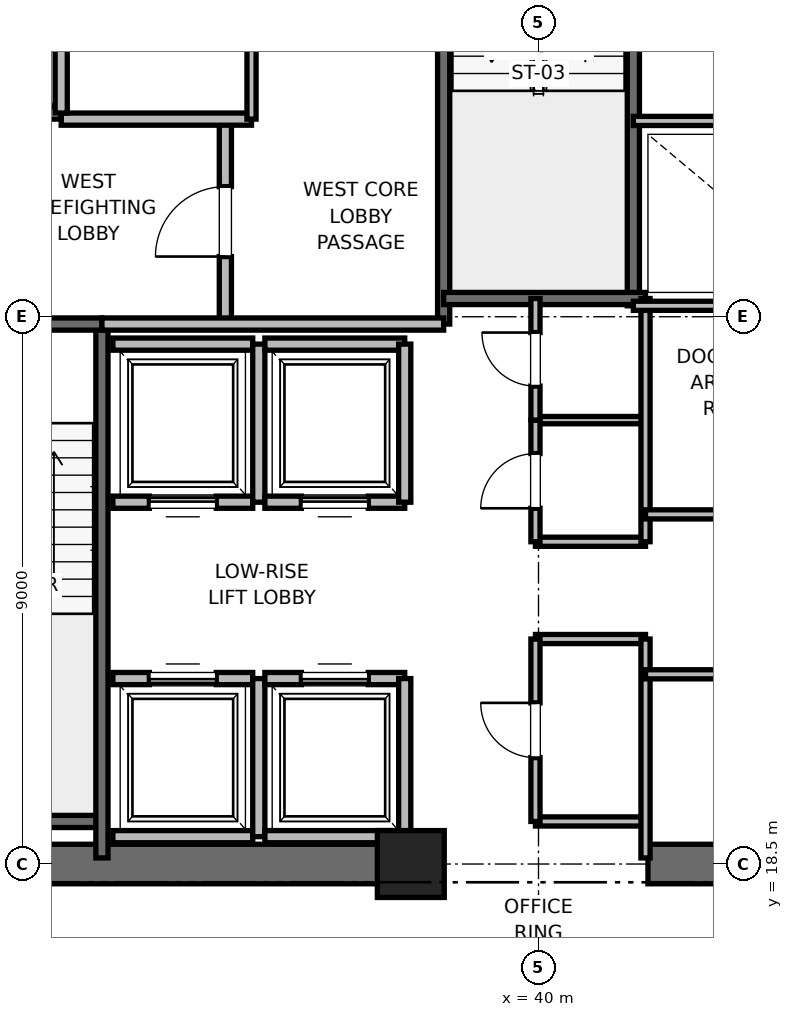
"""IFC4 building model, lengths in metres.
Left out: names, types, materials, properties, quantities, classifications, styles, units other than length and angle.
Written with IfcOpenShell. Run it as: python <this file> out.ifc"""

import sys

from ifc_helpers import new_model, si_unit, direction, frame, frame_2d, origin, origin_2d, place, context, subcontext, project, spatial, rectangle, extrude, element, fill, save


model = new_model("IFC4")
c1 = context("Model", 3, precision=1e-05, world=origin(), true_north=direction((0.0, 1.0)))
c2 = subcontext(c1, "Body", "Model", "MODEL_VIEW")
j1 = project(units=[si_unit("LENGTHUNIT", "METRE"), si_unit("PLANEANGLEUNIT", "RADIAN")], contexts=[c1])
p1 = place(None, origin())
s1 = spatial("IfcSite", under=j1, at=p1, CompositionType="ELEMENT")
p2 = place(p1, origin())
s2 = spatial("IfcBuilding", under=s1, at=p2, CompositionType="ELEMENT")
p3 = place(p2, frame((0.0, 0.0, 79.6)))
s3 = spatial("IfcBuildingStorey", under=s2, at=p3, CompositionType="ELEMENT", Elevation=79.6)
p4 = place(p3, frame((37.9, 18.5, 0.0), z_axis=(0.0, 0.0, 1.0), x_axis=(1.0, 0.0, 0.0)))
e1 = element("IfcColumn", 1, at=p4, inside=s3, PredefinedType="PILASTER", context=c2, shape_type="SweptSolid", body=[
    extrude(rectangle(XDim=1.1, YDim=1.1, at=origin_2d()), origin(), (0.0, 0.0, 1.0), 4.0),
])
for number, where, z_axis, x_axis in (
    (2, (29.0, 18.5, 0.0), (0.0, 0.0, 1.0), (1.0, 0.0, 0.0)),
    (3, (41.8, 18.5, 0.0), (0.0, 0.0, 1.0), (1.0, 0.0, 0.0)),
):
    element("IfcWall", number, at=place(p3, frame(where, z_axis=z_axis, x_axis=x_axis)), inside=s3, PredefinedType="SHEAR", context=c2, shape_type="SweptSolid", body=[
        extrude(rectangle(XDim=9.2, YDim=0.65, at=frame_2d((4.6, 0.0))), origin(), (0.0, 0.0, 1.0), 3.76),
    ])
p5 = place(p3, frame((29.7, 19.2, 0.0), z_axis=(0.0, 0.0, 1.0), x_axis=(1.0, 0.0, 0.0)))
e4 = element("IfcWall", 4, at=p5, inside=s3, PredefinedType="SOLIDWALL", context=c2, shape_type="SweptSolid", body=[
    extrude(rectangle(XDim=3.12, YDim=0.2, at=frame_2d((1.56, 0.0))), origin(), (0.0, 0.0, 1.0), 3.76),
])
p6 = place(p3, frame((32.82, 18.6, 0.0), z_axis=(0.0, 0.0, 1.0), x_axis=(0.0, 1.0, 0.0)))
e5 = element("IfcWall", 5, at=p6, inside=s3, PredefinedType="SOLIDWALL", context=c2, shape_type="SweptSolid", body=[
    extrude(rectangle(XDim=8.78, YDim=0.2, at=frame_2d((4.39, 0.0))), origin(), (0.0, 0.0, 1.0), 3.76),
])
p7 = place(p3, frame((29.7, 27.38, 0.0), z_axis=(0.0, 0.0, 1.0), x_axis=(1.0, 0.0, 0.0)))
e6 = element("IfcWall", 6, at=p7, inside=s3, PredefinedType="SOLIDWALL", context=c2, shape_type="SweptSolid", body=[
    extrude(rectangle(XDim=3.12, YDim=0.2, at=frame_2d((1.56, 0.0))), origin(), (0.0, 0.0, 1.0), 3.76),
])
p8 = place(p7, frame((1.01, 0.0, 0.0)))
e7 = element("IfcOpeningElement", 7, at=p8, cuts=e6, PredefinedType="OPENING", context=c2, shape_type="SweptSolid", body=[
    extrude(rectangle(XDim=1.1, YDim=2.15, at=frame_2d((0.55, 1.075))), frame((0.0, 0.1, 0.0), z_axis=(0.0, -1.0, 0.0), x_axis=(1.0, 0.0, 0.0)), (0.0, 0.0, 1.0), 0.2),
])
p9 = place(p3, frame((38.44, 27.38, 0.0), z_axis=(0.0, 0.0, 1.0), x_axis=(0.0, 1.0, 0.0)))
e8 = element("IfcWall", 8, at=p9, inside=s3, PredefinedType="SOLIDWALL", context=c2, shape_type="SweptSolid", body=[
    extrude(rectangle(XDim=8.87, YDim=0.2, at=frame_2d((4.435, 0.0))), origin(), (0.0, 0.0, 1.0), 3.76),
])
p10 = place(p3, frame((41.56, 27.68, 0.0), z_axis=(0.0, 0.0, 1.0), x_axis=(0.0, 1.0, 0.0)))
e9 = element("IfcWall", 9, at=p10, inside=s3, PredefinedType="SOLIDWALL", context=c2, shape_type="SweptSolid", body=[
    extrude(rectangle(XDim=8.57, YDim=0.2, at=frame_2d((4.285, 0.0))), origin(), (0.0, 0.0, 1.0), 3.76),
])
p11 = place(p3, frame((38.44, 27.8, 0.0), z_axis=(0.0, 0.0, 1.0), x_axis=(1.0, 0.0, 0.0)))
e10 = element("IfcWall", 10, at=p11, inside=s3, PredefinedType="SOLIDWALL", context=c2, shape_type="SweptSolid", body=[
    extrude(rectangle(XDim=3.32, YDim=0.2, at=frame_2d((1.66, 0.0))), origin(), (0.0, 0.0, 1.0), 3.76),
])
p12 = place(p3, frame((34.85, 27.38, 0.0), z_axis=(0.0, 0.0, 1.0), x_axis=(0.0, 1.0, 0.0)))
e11 = element("IfcWall", 11, at=p12, inside=s3, PredefinedType="PARTITIONING", context=c2, shape_type="SweptSolid", body=[
    extrude(rectangle(XDim=3.37, YDim=0.2, at=frame_2d((1.685, 0.0))), origin(), (0.0, 0.0, 1.0), 3.76),
])
p13 = place(p12, frame((1.11, 0.0, 0.0)))
e12 = element("IfcOpeningElement", 12, at=p13, cuts=e11, PredefinedType="OPENING", context=c2, shape_type="SweptSolid", body=[
    extrude(rectangle(XDim=1.15, YDim=2.2, at=frame_2d((0.575, 1.1))), frame((0.0, 0.1, 0.0), z_axis=(0.0, -1.0, 0.0), x_axis=(1.0, 0.0, 0.0)), (0.0, 0.0, 1.0), 0.2),
])
p14 = place(p3, frame((32.82, 27.38, 0.0), z_axis=(0.0, 0.0, 1.0), x_axis=(1.0, 0.0, 0.0)))
e13 = element("IfcWall", 13, at=p14, inside=s3, PredefinedType="PARTITIONING", context=c2, shape_type="SweptSolid", body=[
    extrude(rectangle(XDim=5.62, YDim=0.2, at=frame_2d((2.81, 0.0))), origin(), (0.0, 0.0, 1.0), 3.76),
])
p15 = place(p3, frame((32.15, 30.75, 0.0), z_axis=(0.0, 0.0, 1.0), x_axis=(1.0, 0.0, 0.0)))
e14 = element("IfcWall", 14, at=p15, inside=s3, PredefinedType="PARTITIONING", context=c2, shape_type="SweptSolid", body=[
    extrude(rectangle(XDim=3.13, YDim=0.2, at=frame_2d((1.565, 0.0))), origin(), (0.0, 0.0, 1.0), 3.76),
])
p16 = place(p3, frame((29.55, 30.85, 0.0), z_axis=(0.0, 0.0, 1.0), x_axis=(1.0, 0.0, 0.0)))
e15 = element("IfcWall", 15, at=p16, inside=s3, PredefinedType="SOLIDWALL", context=c2, shape_type="SweptSolid", body=[
    extrude(rectangle(XDim=2.6, YDim=0.2, at=frame_2d((1.3, 0.0))), origin(), (0.0, 0.0, 1.0), 2.54),
])
p17 = place(p16, frame((0.75, 0.0, 0.0)))
e16 = element("IfcOpeningElement", 16, at=p17, cuts=e15, PredefinedType="OPENING", context=c2, shape_type="SweptSolid", body=[
    extrude(rectangle(XDim=1.1, YDim=2.2, at=frame_2d((0.55, 1.1))), frame((0.0, 0.1, 0.0), z_axis=(0.0, -1.0, 0.0), x_axis=(1.0, 0.0, 0.0)), (0.0, 0.0, 1.0), 0.2),
])
p18 = place(p3, frame((32.15, 30.85, 0.0), z_axis=(0.0, 0.0, 1.0), x_axis=(0.0, 1.0, 0.0)))
e17 = element("IfcWall", 17, at=p18, inside=s3, PredefinedType="SOLIDWALL", context=c2, shape_type="SweptSolid", body=[
    extrude(rectangle(XDim=3.0, YDim=0.2, at=frame_2d((1.5, 0.0))), origin(), (0.0, 0.0, 1.0), 3.76),
])
p19 = place(p3, frame((33.0, 18.95, 0.0), z_axis=(0.0, 0.0, 1.0), x_axis=(1.0, 0.0, 0.0)))
e18 = element("IfcWall", 18, at=p19, inside=s3, PredefinedType="SOLIDWALL", context=c2, shape_type="SweptSolid", body=[
    extrude(rectangle(XDim=2.3, YDim=0.2, at=frame_2d((1.15, 0.0))), origin(), (0.0, 0.0, 1.0), 3.76),
])
p20 = place(p3, frame((35.3, 21.55, 0.0), z_axis=(0.0, 0.0, 1.0), x_axis=(-1.0, 0.0, 0.0)))
e19 = element("IfcWall", 19, at=p20, inside=s3, PredefinedType="SOLIDWALL", context=c2, shape_type="SweptSolid", body=[
    extrude(rectangle(XDim=2.3, YDim=0.2, at=frame_2d((1.15, 0.0))), origin(), (0.0, 0.0, 1.0), 3.76),
])
p21 = place(p20, frame((0.6, 0.0, 0.0)))
e20 = element("IfcOpeningElement", 20, at=p21, cuts=e19, PredefinedType="OPENING", context=c2, shape_type="SweptSolid", body=[
    extrude(rectangle(XDim=1.1, YDim=2.2, at=frame_2d((0.55, 1.1))), frame((0.0, 0.1, 0.0), z_axis=(0.0, -1.0, 0.0), x_axis=(1.0, 0.0, 0.0)), (0.0, 0.0, 1.0), 0.2),
])
p22 = place(p3, frame((35.4, 18.95, 0.0), z_axis=(0.0, 0.0, 1.0), x_axis=(0.0, 1.0, 0.0)))
e21 = element("IfcWall", 21, at=p22, inside=s3, PredefinedType="SOLIDWALL", context=c2, shape_type="SweptSolid", body=[
    extrude(rectangle(XDim=2.6, YDim=0.2, at=frame_2d((1.3, 0.0))), origin(), (0.0, 0.0, 1.0), 3.76),
])
p23 = place(p3, frame((35.5, 18.95, 0.0), z_axis=(0.0, 0.0, 1.0), x_axis=(1.0, 0.0, 0.0)))
e22 = element("IfcWall", 22, at=p23, inside=s3, PredefinedType="SOLIDWALL", context=c2, shape_type="SweptSolid", body=[
    extrude(rectangle(XDim=2.3, YDim=0.2, at=frame_2d((1.15, 0.0))), origin(), (0.0, 0.0, 1.0), 2.54),
])
p24 = place(p3, frame((37.8, 21.55, 0.0), z_axis=(0.0, 0.0, 1.0), x_axis=(-1.0, 0.0, 0.0)))
e23 = element("IfcWall", 23, at=p24, inside=s3, PredefinedType="SOLIDWALL", context=c2, shape_type="SweptSolid", body=[
    extrude(rectangle(XDim=2.3, YDim=0.2, at=frame_2d((1.15, 0.0))), origin(), (0.0, 0.0, 1.0), 3.76),
])
p25 = place(p24, frame((0.6, 0.0, 0.0)))
e24 = element("IfcOpeningElement", 24, at=p25, cuts=e23, PredefinedType="OPENING", context=c2, shape_type="SweptSolid", body=[
    extrude(rectangle(XDim=1.1, YDim=2.2, at=frame_2d((0.55, 1.1))), frame((0.0, 0.1, 0.0), z_axis=(0.0, -1.0, 0.0), x_axis=(1.0, 0.0, 0.0)), (0.0, 0.0, 1.0), 0.2),
])
p26 = place(p3, frame((37.8, 18.95, 0.0), z_axis=(0.0, 0.0, 1.0), x_axis=(0.0, 1.0, 0.0)))
e25 = element("IfcWall", 25, at=p26, inside=s3, PredefinedType="SOLIDWALL", context=c2, shape_type="SweptSolid", body=[
    extrude(rectangle(XDim=2.6, YDim=0.2, at=frame_2d((1.3, 0.0))), origin(), (0.0, 0.0, 1.0), 2.54),
])
p27 = place(p3, frame((33.0, 24.45, 0.0), z_axis=(0.0, 0.0, 1.0), x_axis=(1.0, 0.0, 0.0)))
e26 = element("IfcWall", 26, at=p27, inside=s3, PredefinedType="SOLIDWALL", context=c2, shape_type="SweptSolid", body=[
    extrude(rectangle(XDim=2.3, YDim=0.2, at=frame_2d((1.15, 0.0))), origin(), (0.0, 0.0, 1.0), 3.76),
])
p28 = place(p27, frame((0.6, 0.0, 0.0)))
e27 = element("IfcOpeningElement", 27, at=p28, cuts=e26, PredefinedType="OPENING", context=c2, shape_type="SweptSolid", body=[
    extrude(rectangle(XDim=1.1, YDim=2.2, at=frame_2d((0.55, 1.1))), frame((0.0, 0.1, 0.0), z_axis=(0.0, -1.0, 0.0), x_axis=(1.0, 0.0, 0.0)), (0.0, 0.0, 1.0), 0.2),
])
p29 = place(p3, frame((35.3, 27.05, 0.0), z_axis=(0.0, 0.0, 1.0), x_axis=(-1.0, 0.0, 0.0)))
e28 = element("IfcWall", 28, at=p29, inside=s3, PredefinedType="SOLIDWALL", context=c2, shape_type="SweptSolid", body=[
    extrude(rectangle(XDim=2.3, YDim=0.2, at=frame_2d((1.15, 0.0))), origin(), (0.0, 0.0, 1.0), 3.76),
])
p30 = place(p3, frame((35.4, 24.45, 0.0), z_axis=(0.0, 0.0, 1.0), x_axis=(0.0, 1.0, 0.0)))
e29 = element("IfcWall", 29, at=p30, inside=s3, PredefinedType="SOLIDWALL", context=c2, shape_type="SweptSolid", body=[
    extrude(rectangle(XDim=2.6, YDim=0.2, at=frame_2d((1.3, 0.0))), origin(), (0.0, 0.0, 1.0), 3.76),
])
p31 = place(p3, frame((35.5, 24.45, 0.0), z_axis=(0.0, 0.0, 1.0), x_axis=(1.0, 0.0, 0.0)))
e30 = element("IfcWall", 30, at=p31, inside=s3, PredefinedType="SOLIDWALL", context=c2, shape_type="SweptSolid", body=[
    extrude(rectangle(XDim=2.3, YDim=0.2, at=frame_2d((1.15, 0.0))), origin(), (0.0, 0.0, 1.0), 3.76),
])
p32 = place(p31, frame((0.6, 0.0, 0.0)))
e31 = element("IfcOpeningElement", 31, at=p32, cuts=e30, PredefinedType="OPENING", context=c2, shape_type="SweptSolid", body=[
    extrude(rectangle(XDim=1.1, YDim=2.2, at=frame_2d((0.55, 1.1))), frame((0.0, 0.1, 0.0), z_axis=(0.0, -1.0, 0.0), x_axis=(1.0, 0.0, 0.0)), (0.0, 0.0, 1.0), 0.2),
])
p33 = place(p3, frame((37.8, 27.05, 0.0), z_axis=(0.0, 0.0, 1.0), x_axis=(-1.0, 0.0, 0.0)))
e32 = element("IfcWall", 32, at=p33, inside=s3, PredefinedType="SOLIDWALL", context=c2, shape_type="SweptSolid", body=[
    extrude(rectangle(XDim=2.3, YDim=0.2, at=frame_2d((1.15, 0.0))), origin(), (0.0, 0.0, 1.0), 3.76),
])
p34 = place(p3, frame((37.8, 24.45, 0.0), z_axis=(0.0, 0.0, 1.0), x_axis=(0.0, 1.0, 0.0)))
e33 = element("IfcWall", 33, at=p34, inside=s3, PredefinedType="SOLIDWALL", context=c2, shape_type="SweptSolid", body=[
    extrude(rectangle(XDim=2.6, YDim=0.2, at=frame_2d((1.3, 0.0))), origin(), (0.0, 0.0, 1.0), 3.76),
])
for number, where, z_axis, x_axis in (
    (34, (39.95, 19.2, 0.0), (0.0, 0.0, 1.0), (1.0, 0.0, 0.0)),
    (35, (39.95, 22.2, 0.0), (0.0, 0.0, 1.0), (1.0, 0.0, 0.0)),
    (36, (39.95, 23.8, 0.0), (0.0, 0.0, 1.0), (1.0, 0.0, 0.0)),
):
    element("IfcWall", number, at=place(p3, frame(where, z_axis=z_axis, x_axis=x_axis)), inside=s3, PredefinedType="PARTITIONING", context=c2, shape_type="SweptSolid", body=[
        extrude(rectangle(XDim=1.81, YDim=0.15, at=frame_2d((0.905, 0.0))), origin(), (0.0, 0.0, 1.0), 2.85),
    ])
p35 = place(p3, frame((39.95, 25.8, 0.0), z_axis=(0.0, 0.0, 1.0), x_axis=(1.0, 0.0, 0.0)))
e37 = element("IfcWall", 37, at=p35, inside=s3, PredefinedType="PARTITIONING", context=c2, shape_type="SweptSolid", body=[
    extrude(rectangle(XDim=1.81, YDim=0.12, at=frame_2d((0.905, 0.0))), origin(), (0.0, 0.0, 1.0), 2.85),
])
p36 = place(p3, frame((41.76, 18.6, 0.0), z_axis=(0.0, 0.0, 1.0), x_axis=(0.0, 1.0, 0.0)))
e38 = element("IfcWall", 38, at=p36, inside=s3, PredefinedType="PARTITIONING", context=c2, shape_type="SweptSolid", body=[
    extrude(rectangle(XDim=3.6, YDim=0.15, at=frame_2d((1.8, 0.0))), origin(), (0.0, 0.0, 1.0), 2.54),
])
p37 = place(p3, frame((41.76, 23.8, 0.0), z_axis=(0.0, 0.0, 1.0), x_axis=(0.0, 1.0, 0.0)))
e39 = element("IfcWall", 39, at=p37, inside=s3, PredefinedType="PARTITIONING", context=c2, shape_type="SweptSolid", body=[
    extrude(rectangle(XDim=4.0, YDim=0.15, at=frame_2d((2.0, 0.0))), origin(), (0.0, 0.0, 1.0), 2.85),
])
p38 = place(p3, frame((39.95, 19.2, 0.0), z_axis=(0.0, 0.0, 1.0), x_axis=(0.0, 1.0, 0.0)))
e40 = element("IfcWall", 40, at=p38, inside=s3, PredefinedType="PARTITIONING", context=c2, shape_type="SweptSolid", body=[
    extrude(rectangle(XDim=3.0, YDim=0.15, at=frame_2d((1.5, 0.0))), origin(), (0.0, 0.0, 1.0), 2.85),
])
p39 = place(p38, frame((1.05, 0.0, 0.0)))
e41 = element("IfcOpeningElement", 41, at=p39, cuts=e40, PredefinedType="OPENING", context=c2, shape_type="SweptSolid", body=[
    extrude(rectangle(XDim=0.9, YDim=2.1, at=frame_2d((0.45, 1.05))), frame((0.0, 0.075, 0.0), z_axis=(0.0, -1.0, 0.0), x_axis=(1.0, 0.0, 0.0)), (0.0, 0.0, 1.0), 0.15),
])
p40 = place(p3, frame((39.95, 23.8, 0.0), z_axis=(0.0, 0.0, 1.0), x_axis=(0.0, 1.0, 0.0)))
e42 = element("IfcWall", 42, at=p40, inside=s3, PredefinedType="PARTITIONING", context=c2, shape_type="SweptSolid", body=[
    extrude(rectangle(XDim=2.0, YDim=0.15, at=frame_2d((1.0, 0.0))), origin(), (0.0, 0.0, 1.0), 2.85),
])
p41 = place(p40, frame((0.55, 0.0, 0.0)))
e43 = element("IfcOpeningElement", 43, at=p41, cuts=e42, PredefinedType="OPENING", context=c2, shape_type="SweptSolid", body=[
    extrude(rectangle(XDim=0.9, YDim=2.1, at=frame_2d((0.45, 1.05))), frame((0.0, 0.075, 0.0), z_axis=(0.0, -1.0, 0.0), x_axis=(1.0, 0.0, 0.0)), (0.0, 0.0, 1.0), 0.15),
])
p42 = place(p3, frame((39.95, 25.8, 0.0), z_axis=(0.0, 0.0, 1.0), x_axis=(0.0, 1.0, 0.0)))
e44 = element("IfcWall", 44, at=p42, inside=s3, PredefinedType="PARTITIONING", context=c2, shape_type="SweptSolid", body=[
    extrude(rectangle(XDim=2.0, YDim=0.15, at=frame_2d((1.0, 0.0))), origin(), (0.0, 0.0, 1.0), 2.85),
])
p43 = place(p42, frame((0.56, 0.0, 0.0)))
e45 = element("IfcOpeningElement", 45, at=p43, cuts=e44, PredefinedType="OPENING", context=c2, shape_type="SweptSolid", body=[
    extrude(rectangle(XDim=0.88, YDim=2.1, at=frame_2d((0.44, 1.05))), frame((0.0, 0.075, 0.0), z_axis=(0.0, -1.0, 0.0), x_axis=(1.0, 0.0, 0.0)), (0.0, 0.0, 1.0), 0.15),
])
p44 = place(p3, frame((35.28, 30.75, 0.0), z_axis=(0.0, 0.0, 1.0), x_axis=(0.0, 1.0, 0.0)))
e46 = element("IfcWall", 46, at=p44, inside=s3, PredefinedType="PARTITIONING", context=c2, shape_type="SweptSolid", body=[
    extrude(rectangle(XDim=3.2, YDim=0.15, at=frame_2d((1.6, 0.0))), origin(), (0.0, 0.0, 1.0), 2.85),
])
p45 = place(p44, frame((1.15, 0.0, 0.0)))
e47 = element("IfcOpeningElement", 47, at=p45, cuts=e46, PredefinedType="OPENING", context=c2, shape_type="SweptSolid", body=[
    extrude(rectangle(XDim=0.9, YDim=2.1, at=frame_2d((0.45, 1.05))), frame((0.0, 0.075, 0.0), z_axis=(0.0, -1.0, 0.0), x_axis=(1.0, 0.0, 0.0)), (0.0, 0.0, 1.0), 0.15),
])
p46 = place(p3, frame((41.56, 27.68, 0.0), z_axis=(0.0, 0.0, 1.0), x_axis=(1.0, 0.0, 0.0)))
e48 = element("IfcWall", 48, at=p46, inside=s3, PredefinedType="PARTITIONING", context=c2, shape_type="SweptSolid", body=[
    extrude(rectangle(XDim=3.59, YDim=0.15, at=frame_2d((1.795, 0.0))), origin(), (0.0, 0.0, 1.0), 2.85),
])
p47 = place(p3, frame((41.76, 21.62, 0.0), z_axis=(0.0, 0.0, 1.0), x_axis=(1.0, 0.0, 0.0)))
e49 = element("IfcWall", 49, at=p47, inside=s3, PredefinedType="PARTITIONING", context=c2, shape_type="SweptSolid", body=[
    extrude(rectangle(XDim=5.98, YDim=0.15, at=frame_2d((2.99, 0.0))), origin(), (0.0, 0.0, 1.0), 2.85),
])
p48 = place(p47, frame((2.49, 0.0, 0.0)))
e50 = element("IfcOpeningElement", 50, at=p48, cuts=e49, PredefinedType="OPENING", context=c2, shape_type="SweptSolid", body=[
    extrude(rectangle(XDim=1.0, YDim=2.15, at=frame_2d((0.5, 1.075))), frame((0.0, 0.075, 0.0), z_axis=(0.0, -1.0, 0.0), x_axis=(1.0, 0.0, 0.0)), (0.0, 0.0, 1.0), 0.15),
])
p49 = place(p3, frame((41.76, 24.25, 0.0), z_axis=(0.0, 0.0, 1.0), x_axis=(1.0, 0.0, 0.0)))
e51 = element("IfcWall", 51, at=p49, inside=s3, PredefinedType="PARTITIONING", context=c2, shape_type="SweptSolid", body=[
    extrude(rectangle(XDim=3.39, YDim=0.15, at=frame_2d((1.695, 0.0))), origin(), (0.0, 0.0, 1.0), 2.85),
])
p50 = place(p49, frame((1.195, 0.0, 0.0)))
e52 = element("IfcOpeningElement", 52, at=p50, cuts=e51, PredefinedType="OPENING", context=c2, shape_type="SweptSolid", body=[
    extrude(rectangle(XDim=1.0, YDim=2.15, at=frame_2d((0.5, 1.075))), frame((0.0, 0.075, 0.0), z_axis=(0.0, -1.0, 0.0), x_axis=(1.0, 0.0, 0.0)), (0.0, 0.0, 1.0), 0.15),
])
p51 = place(p3, frame((41.56, 30.72, 0.0), z_axis=(0.0, 0.0, 1.0), x_axis=(1.0, 0.0, 0.0)))
e53 = element("IfcWall", 53, at=p51, inside=s3, PredefinedType="PARTITIONING", context=c2, shape_type="SweptSolid", body=[
    extrude(rectangle(XDim=3.59, YDim=0.15, at=frame_2d((1.795, 0.0))), origin(), (0.0, 0.0, 1.0), 2.85),
])
p52 = place(p51, frame((1.355, 0.0, 0.0)))
e54 = element("IfcOpeningElement", 54, at=p52, cuts=e53, PredefinedType="OPENING", context=c2, shape_type="SweptSolid", body=[
    extrude(rectangle(XDim=0.88, YDim=2.1, at=frame_2d((0.44, 1.05))), frame((0.0, 0.075, 0.0), z_axis=(0.0, -1.0, 0.0), x_axis=(1.0, 0.0, 0.0)), (0.0, 0.0, 1.0), 0.15),
])
p53 = place(p13, origin())
e55 = element("IfcDoor", 55, at=p53, inside=s3, OperationType="SINGLE_SWING_LEFT", PredefinedType="DOOR", context=c2, shape_type="SweptSolid", body=[
    extrude(rectangle(XDim=1.15, YDim=2.2, at=frame_2d((0.575, 1.1))), frame((0.0, 0.025, 0.0), z_axis=(0.0, -1.0, 0.0), x_axis=(1.0, 0.0, 0.0)), (0.0, 0.0, 1.0), 0.05),
])
fill(e12, e55)
p54 = place(p21, origin())
e56 = element("IfcDoor", 56, at=p54, inside=s3, OperationType="SLIDING_TO_RIGHT", PredefinedType="DOOR", context=c2, shape_type="SweptSolid", body=[
    extrude(rectangle(XDim=1.1, YDim=2.2, at=frame_2d((0.55, 1.1))), frame((0.0, 0.025, 0.0), z_axis=(0.0, -1.0, 0.0), x_axis=(1.0, 0.0, 0.0)), (0.0, 0.0, 1.0), 0.05),
])
fill(e20, e56)
p55 = place(p25, origin())
e57 = element("IfcDoor", 57, at=p55, inside=s3, OperationType="SLIDING_TO_RIGHT", PredefinedType="DOOR", context=c2, shape_type="SweptSolid", body=[
    extrude(rectangle(XDim=1.1, YDim=2.2, at=frame_2d((0.55, 1.1))), frame((0.0, 0.025, 0.0), z_axis=(0.0, -1.0, 0.0), x_axis=(1.0, 0.0, 0.0)), (0.0, 0.0, 1.0), 0.05),
])
fill(e24, e57)
p56 = place(p28, origin())
e58 = element("IfcDoor", 58, at=p56, inside=s3, OperationType="SLIDING_TO_RIGHT", PredefinedType="DOOR", context=c2, shape_type="SweptSolid", body=[
    extrude(rectangle(XDim=1.1, YDim=2.2, at=frame_2d((0.55, 1.1))), frame((0.0, 0.025, 0.0), z_axis=(0.0, -1.0, 0.0), x_axis=(1.0, 0.0, 0.0)), (0.0, 0.0, 1.0), 0.05),
])
fill(e27, e58)
p57 = place(p32, origin())
e59 = element("IfcDoor", 59, at=p57, inside=s3, OperationType="SLIDING_TO_RIGHT", PredefinedType="DOOR", context=c2, shape_type="SweptSolid", body=[
    extrude(rectangle(XDim=1.1, YDim=2.2, at=frame_2d((0.55, 1.1))), frame((0.0, 0.025, 0.0), z_axis=(0.0, -1.0, 0.0), x_axis=(1.0, 0.0, 0.0)), (0.0, 0.0, 1.0), 0.05),
])
fill(e31, e59)
p58 = place(p39, origin())
e60 = element("IfcDoor", 60, at=p58, inside=s3, OperationType="SINGLE_SWING_RIGHT", PredefinedType="DOOR", context=c2, shape_type="SweptSolid", body=[
    extrude(rectangle(XDim=0.9, YDim=2.1, at=frame_2d((0.45, 1.05))), frame((0.0, 0.025, 0.0), z_axis=(0.0, -1.0, 0.0), x_axis=(1.0, 0.0, 0.0)), (0.0, 0.0, 1.0), 0.05),
])
fill(e41, e60)
p59 = place(p41, origin())
e61 = element("IfcDoor", 61, at=p59, inside=s3, OperationType="SINGLE_SWING_LEFT", PredefinedType="DOOR", context=c2, shape_type="SweptSolid", body=[
    extrude(rectangle(XDim=0.9, YDim=2.1, at=frame_2d((0.45, 1.05))), frame((0.0, 0.025, 0.0), z_axis=(0.0, -1.0, 0.0), x_axis=(1.0, 0.0, 0.0)), (0.0, 0.0, 1.0), 0.05),
])
fill(e43, e61)
p60 = place(p43, origin())
e62 = element("IfcDoor", 62, at=p60, inside=s3, OperationType="SINGLE_SWING_RIGHT", PredefinedType="DOOR", context=c2, shape_type="SweptSolid", body=[
    extrude(rectangle(XDim=0.88, YDim=2.1, at=frame_2d((0.44, 1.05))), frame((0.0, 0.025, 0.0), z_axis=(0.0, -1.0, 0.0), x_axis=(1.0, 0.0, 0.0)), (0.0, 0.0, 1.0), 0.05),
])
fill(e45, e62)
save(model, sys.argv[1])
